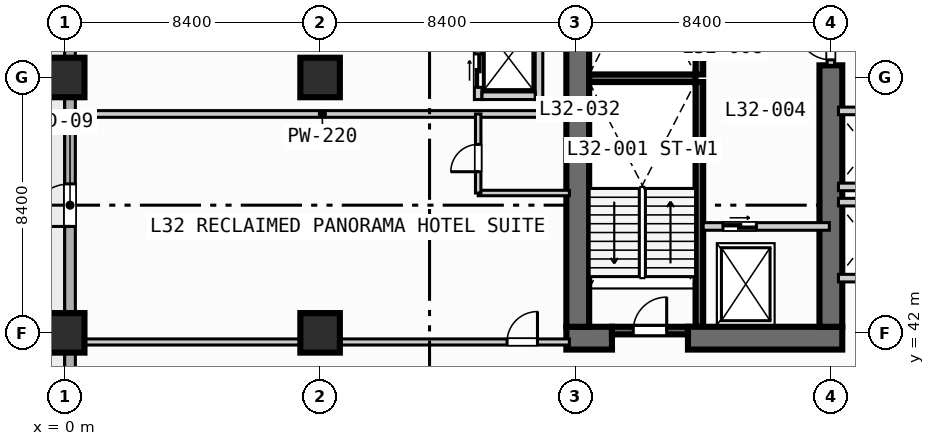
"""IFC4 building model, lengths in metres.
Left out: names, types, materials, properties, quantities, classifications, styles, units other than length and angle.
Written with IfcOpenShell. Run it as: python <this file> out.ifc"""

import sys

from ifc_helpers import new_model, si_unit, direction, frame, frame_2d, origin, origin_2d, place, context, subcontext, project, spatial, rectangle, extrude, element, fill, save


model = new_model("IFC4")
c1 = context("Model", 3, precision=1e-05, world=origin(), true_north=direction((0.0, 1.0)))
c2 = subcontext(c1, "Body", "Model", "MODEL_VIEW")
j1 = project(units=[si_unit("LENGTHUNIT", "METRE"), si_unit("PLANEANGLEUNIT", "RADIAN")], contexts=[c1])
p1 = place(None, origin())
s1 = spatial("IfcSite", under=j1, at=p1, CompositionType="ELEMENT")
p2 = place(p1, origin())
s2 = spatial("IfcBuilding", under=s1, at=p2, CompositionType="ELEMENT")
p3 = place(p2, frame((0.0, 0.0, 134.2)))
s3 = spatial("IfcBuildingStorey", under=s2, at=p3, CompositionType="ELEMENT", Elevation=134.2)
for number, where, z_axis, x_axis in (
    (1, (20.875, 42.2, 0.0), (0.0, 0.0, 1.0), (0.0, 1.0, 0.0)),
    (2, (20.875, 50.5, 0.0), (0.0, 0.0, 1.0), (0.0, 1.0, 0.0)),
):
    element("IfcWall", number, at=place(p3, frame(where, z_axis=z_axis, x_axis=x_axis)), inside=s3, PredefinedType="SOLIDWALL", context=c2, shape_type="SweptSolid", body=[
        extrude(rectangle(XDim=8.05, YDim=0.25, at=frame_2d((4.025, 0.0))), origin(), (0.0, 0.0, 1.0), 3.55),
    ])
p4 = place(p3, frame((17.25, 50.375, 0.0), z_axis=(0.0, 0.0, 1.0), x_axis=(1.0, 0.0, 0.0)))
e3 = element("IfcWall", 3, at=p4, inside=s3, PredefinedType="SOLIDWALL", context=c2, shape_type="SweptSolid", body=[
    extrude(rectangle(XDim=3.5, YDim=0.25, at=frame_2d((1.75, 0.0))), origin(), (0.0, 0.0, 1.0), 3.55),
])
p5 = place(p3, frame((16.5, 41.825, 0.0), z_axis=(0.0, 0.0, 1.0), x_axis=(1.0, 0.0, 0.0)))
e4 = element("IfcWall", 4, at=p5, inside=s3, PredefinedType="SHEAR", context=c2, shape_type="SweptSolid", body=[
    extrude(rectangle(XDim=1.5, YDim=0.75, at=frame_2d((0.75, 0.0))), origin(), (0.0, 0.0, 1.0), 3.55),
])
p6 = place(p3, frame((20.5, 41.825, 0.0), z_axis=(0.0, 0.0, 1.0), x_axis=(1.0, 0.0, 0.0)))
e5 = element("IfcWall", 5, at=p6, inside=s3, PredefinedType="SHEAR", context=c2, shape_type="SweptSolid", body=[
    extrude(rectangle(XDim=5.075, YDim=0.75, at=frame_2d((2.538, 0.0))), origin(), (0.0, 0.0, 1.0), 3.55),
])
p7 = place(p3, frame((16.875, 42.2, 0.0), z_axis=(0.0, 0.0, 1.0), x_axis=(0.0, 1.0, 0.0)))
e6 = element("IfcWall", 6, at=p7, inside=s3, PredefinedType="SHEAR", context=c2, shape_type="SweptSolid", body=[
    extrude(rectangle(XDim=16.35, YDim=0.75, at=frame_2d((8.175, 0.0))), origin(), (0.0, 0.0, 1.0), 3.55),
])
p8 = place(p3, frame((25.2, 42.2, 0.0), z_axis=(0.0, 0.0, 1.0), x_axis=(0.0, 1.0, 0.0)))
e7 = element("IfcWall", 7, at=p8, inside=s3, PredefinedType="SHEAR", context=c2, shape_type="SweptSolid", body=[
    extrude(rectangle(XDim=8.6, YDim=0.75, at=frame_2d((4.3, 0.0))), origin(), (0.0, 0.0, 1.0), 3.55),
])
for number, where, z_axis, x_axis in (
    (8, (0.0, 42.0, 0.0), (0.0, 0.0, 1.0), (1.0, 0.0, 0.0)),
    (9, (0.0, 50.4, 0.0), (0.0, 0.0, 1.0), (1.0, 0.0, 0.0)),
    (10, (8.4, 42.0, 0.0), (0.0, 0.0, 1.0), (1.0, 0.0, 0.0)),
    (11, (8.4, 50.4, 0.0), (0.0, 0.0, 1.0), (1.0, 0.0, 0.0)),
):
    element("IfcColumn", number, at=place(p3, frame(where, z_axis=z_axis, x_axis=x_axis)), inside=s3, PredefinedType="COLUMN", context=c2, shape_type="SweptSolid", body=[
        extrude(rectangle(XDim=1.3, YDim=1.3, at=origin_2d()), origin(), (0.0, 0.0, 1.0), 3.8),
    ])
p9 = place(p3, frame((0.175, 3.175, 0.0), z_axis=(0.0, 0.0, 1.0), x_axis=(0.0, 1.0, 0.0)))
e12 = element("IfcWall", 12, at=p9, inside=s3, PredefinedType="STANDARD", context=c2, shape_type="SweptSolid", body=[
    extrude(rectangle(XDim=86.05, YDim=0.35, at=frame_2d((43.025, 0.0))), origin(), (0.0, 0.0, 1.0), 3.55),
])
p10 = place(p9, frame((42.325, 0.0, 0.0)))
e13 = element("IfcOpeningElement", 13, at=p10, cuts=e12, PredefinedType="OPENING", context=c2, shape_type="SweptSolid", body=[
    extrude(rectangle(XDim=1.4, YDim=2.2, at=frame_2d((0.7, 1.1))), frame((0.0, 0.185, 0.0), z_axis=(0.0, -1.0, 0.0), x_axis=(1.0, 0.0, 0.0)), (0.0, 0.0, 1.0), 0.37),
])
p11 = place(p9, frame((25.125, 0.0, 0.85)))
e14 = element("IfcOpeningElement", 14, at=p11, cuts=e12, PredefinedType="OPENING", context=c2, shape_type="SweptSolid", body=[
    extrude(rectangle(XDim=2.2, YDim=1.8, at=frame_2d((1.1, 0.9))), frame((0.0, 0.185, 0.0), z_axis=(0.0, -1.0, 0.0), x_axis=(1.0, 0.0, 0.0)), (0.0, 0.0, 1.0), 0.37),
])
p12 = place(p9, frame((33.525, 0.0, 0.85)))
e15 = element("IfcOpeningElement", 15, at=p12, cuts=e12, PredefinedType="OPENING", context=c2, shape_type="SweptSolid", body=[
    extrude(rectangle(XDim=2.2, YDim=1.8, at=frame_2d((1.1, 0.9))), frame((0.0, 0.185, 0.0), z_axis=(0.0, -1.0, 0.0), x_axis=(1.0, 0.0, 0.0)), (0.0, 0.0, 1.0), 0.37),
])
p13 = place(p3, frame((18.0, 42.075, 0.0), z_axis=(0.0, 0.0, 1.0), x_axis=(1.0, 0.0, 0.0)))
e16 = element("IfcWall", 16, at=p13, inside=s3, PredefinedType="SOLIDWALL", context=c2, shape_type="SweptSolid", body=[
    extrude(rectangle(XDim=2.5, YDim=0.25, at=frame_2d((1.25, 0.0))), origin(), (0.0, 0.0, 1.0), 3.55),
])
p14 = place(p13, frame((0.7, 0.0, 0.0)))
e17 = element("IfcOpeningElement", 17, at=p14, cuts=e16, PredefinedType="OPENING", context=c2, shape_type="SweptSolid", body=[
    extrude(rectangle(XDim=1.1, YDim=2.15, at=frame_2d((0.55, 1.075))), frame((0.0, 0.135, 0.0), z_axis=(0.0, -1.0, 0.0), x_axis=(1.0, 0.0, 0.0)), (0.0, 0.0, 1.0), 0.27),
])
p15 = place(p3, frame((21.0, 45.5, 0.0), z_axis=(0.0, 0.0, 1.0), x_axis=(1.0, 0.0, 0.0)))
e18 = element("IfcWall", 18, at=p15, inside=s3, PredefinedType="SOLIDWALL", context=c2, shape_type="SweptSolid", body=[
    extrude(rectangle(XDim=4.15, YDim=0.25, at=frame_2d((2.075, 0.0))), origin(), (0.0, 0.0, 1.0), 3.55),
])
p16 = place(p15, frame((0.65, 0.0, 0.0)))
e19 = element("IfcOpeningElement", 19, at=p16, cuts=e18, PredefinedType="OPENING", context=c2, shape_type="SweptSolid", body=[
    extrude(rectangle(XDim=1.1, YDim=2.15, at=frame_2d((0.55, 1.075))), frame((0.0, 0.135, 0.0), z_axis=(0.0, -1.0, 0.0), x_axis=(1.0, 0.0, 0.0)), (0.0, 0.0, 1.0), 0.27),
])
p17 = place(p3, frame((25.2, 50.8, 0.0), z_axis=(0.0, 0.0, 1.0), x_axis=(0.0, 1.0, 0.0)))
e20 = element("IfcWall", 20, at=p17, inside=s3, PredefinedType="SOLIDWALL", context=c2, shape_type="SweptSolid", body=[
    extrude(rectangle(XDim=1.48, YDim=0.25, at=frame_2d((0.74, 0.0))), origin(), (0.0, 0.0, 1.0), 3.55),
])
p18 = place(p17, frame((0.18, 0.0, 0.0)))
e21 = element("IfcOpeningElement", 21, at=p18, cuts=e20, PredefinedType="OPENING", context=c2, shape_type="SweptSolid", body=[
    extrude(rectangle(XDim=1.1, YDim=2.15, at=frame_2d((0.55, 1.075))), frame((0.0, 0.135, 0.0), z_axis=(0.0, -1.0, 0.0), x_axis=(1.0, 0.0, 0.0)), (0.0, 0.0, 1.0), 0.27),
])
p19 = place(p3, frame((13.6, 49.675, 0.0), z_axis=(0.0, 0.0, 1.0), x_axis=(0.0, 1.0, 0.0)))
e22 = element("IfcWall", 22, at=p19, inside=s3, PredefinedType="SOLIDWALL", context=c2, shape_type="SweptSolid", body=[
    extrude(rectangle(XDim=2.75, YDim=0.25, at=frame_2d((1.375, 0.0))), origin(), (0.0, 0.0, 1.0), 3.55),
])
p20 = place(p19, frame((0.4, 0.0, 0.0)))
e23 = element("IfcOpeningElement", 23, at=p20, cuts=e22, PredefinedType="OPENING", context=c2, shape_type="SweptSolid", body=[
    extrude(rectangle(XDim=1.1, YDim=2.15, at=frame_2d((0.55, 1.075))), frame((0.0, 0.135, 0.0), z_axis=(0.0, -1.0, 0.0), x_axis=(1.0, 0.0, 0.0)), (0.0, 0.0, 1.0), 0.27),
])
p21 = place(p3, frame((15.6, 49.675, 0.0), z_axis=(0.0, 0.0, 1.0), x_axis=(0.0, 1.0, 0.0)))
e24 = element("IfcWall", 24, at=p21, inside=s3, PredefinedType="SOLIDWALL", context=c2, shape_type="SweptSolid", body=[
    extrude(rectangle(XDim=2.75, YDim=0.25, at=frame_2d((1.375, 0.0))), origin(), (0.0, 0.0, 1.0), 3.55),
])
p22 = place(p3, frame((13.725, 49.8, 0.0), z_axis=(0.0, 0.0, 1.0), x_axis=(1.0, 0.0, 0.0)))
e25 = element("IfcWall", 25, at=p22, inside=s3, PredefinedType="SOLIDWALL", context=c2, shape_type="SweptSolid", body=[
    extrude(rectangle(XDim=1.75, YDim=0.25, at=frame_2d((0.875, 0.0))), origin(), (0.0, 0.0, 1.0), 3.55),
])
for number, where, z_axis, x_axis in (
    (26, (25.45, 43.8, 0.0), (0.0, 0.0, 1.0), (1.0, 0.0, 0.0)),
    (27, (25.45, 46.3, 0.0), (0.0, 0.0, 1.0), (1.0, 0.0, 0.0)),
    (28, (25.45, 46.8, 0.0), (0.0, 0.0, 1.0), (1.0, 0.0, 0.0)),
    (29, (25.45, 49.3, 0.0), (0.0, 0.0, 1.0), (1.0, 0.0, 0.0)),
):
    element("IfcWall", number, at=place(p3, frame(where, z_axis=z_axis, x_axis=x_axis)), inside=s3, PredefinedType="SOLIDWALL", context=c2, shape_type="SweptSolid", body=[
        extrude(rectangle(XDim=1.825, YDim=0.25, at=frame_2d((0.913, 0.0))), origin(), (0.0, 0.0, 1.0), 3.55),
    ])
p23 = place(p3, frame((0.35, 41.7, 0.0), z_axis=(0.0, 0.0, 1.0), x_axis=(1.0, 0.0, 0.0)))
e30 = element("IfcWall", 30, at=p23, inside=s3, PredefinedType="PARTITIONING", context=c2, shape_type="SweptSolid", body=[
    extrude(rectangle(XDim=16.25, YDim=0.2, at=frame_2d((8.125, 0.0))), origin(), (0.0, 0.0, 1.0), 2.8),
])
p24 = place(p23, frame((14.2, 0.0, 0.0)))
e31 = element("IfcOpeningElement", 31, at=p24, cuts=e30, PredefinedType="OPENING", context=c2, shape_type="SweptSolid", body=[
    extrude(rectangle(XDim=1.0, YDim=2.15, at=frame_2d((0.5, 1.075))), frame((0.0, 0.11, 0.0), z_axis=(0.0, -1.0, 0.0), x_axis=(1.0, 0.0, 0.0)), (0.0, 0.0, 1.0), 0.22),
])
p25 = place(p3, frame((0.35, 49.2, 0.0), z_axis=(0.0, 0.0, 1.0), x_axis=(1.0, 0.0, 0.0)))
e32 = element("IfcWall", 32, at=p25, inside=s3, PredefinedType="PARTITIONING", context=c2, shape_type="SweptSolid", body=[
    extrude(rectangle(XDim=16.25, YDim=0.22, at=frame_2d((8.125, 0.0))), origin(), (0.0, 0.0, 1.0), 3.55),
])
p26 = place(p3, frame((13.6, 46.6, 0.0), z_axis=(0.0, 0.0, 1.0), x_axis=(1.0, 0.0, 0.0)))
e33 = element("IfcWall", 33, at=p26, inside=s3, PredefinedType="PLUMBINGWALL", context=c2, shape_type="SweptSolid", body=[
    extrude(rectangle(XDim=3.0, YDim=0.18, at=frame_2d((1.5, 0.0))), origin(), (0.0, 0.0, 1.0), 3.55),
])
p27 = place(p3, frame((13.6, 46.6, 0.0), z_axis=(0.0, 0.0, 1.0), x_axis=(0.0, 1.0, 0.0)))
e34 = element("IfcWall", 34, at=p27, inside=s3, PredefinedType="PLUMBINGWALL", context=c2, shape_type="SweptSolid", body=[
    extrude(rectangle(XDim=2.6, YDim=0.18, at=frame_2d((1.3, 0.0))), origin(), (0.0, 0.0, 1.0), 3.55),
])
p28 = place(p27, frame((0.7, 0.0, 0.0)))
e35 = element("IfcOpeningElement", 35, at=p28, cuts=e34, PredefinedType="OPENING", context=c2, shape_type="SweptSolid", body=[
    extrude(rectangle(XDim=0.9, YDim=2.1, at=frame_2d((0.45, 1.05))), frame((0.0, 0.1, 0.0), z_axis=(0.0, -1.0, 0.0), x_axis=(1.0, 0.0, 0.0)), (0.0, 0.0, 1.0), 0.2),
])
p29 = place(p10, origin())
e36 = element("IfcDoor", 36, at=p29, inside=s3, OperationType="SINGLE_SWING_LEFT", PredefinedType="DOOR", context=c2, shape_type="SweptSolid", body=[
    extrude(rectangle(XDim=1.4, YDim=2.2, at=frame_2d((0.7, 1.1))), frame((0.0, 0.025, 0.0), z_axis=(0.0, -1.0, 0.0), x_axis=(1.0, 0.0, 0.0)), (0.0, 0.0, 1.0), 0.05),
])
fill(e13, e36)
p30 = place(p14, origin())
e37 = element("IfcDoor", 37, at=p30, inside=s3, OperationType="SINGLE_SWING_RIGHT", PredefinedType="DOOR", context=c2, shape_type="SweptSolid", body=[
    extrude(rectangle(XDim=1.1, YDim=2.15, at=frame_2d((0.55, 1.075))), frame((0.0, 0.025, 0.0), z_axis=(0.0, -1.0, 0.0), x_axis=(1.0, 0.0, 0.0)), (0.0, 0.0, 1.0), 0.05),
])
fill(e17, e37)
p31 = place(p16, origin())
e38 = element("IfcDoor", 38, at=p31, inside=s3, OperationType="SLIDING_TO_LEFT", PredefinedType="DOOR", context=c2, shape_type="SweptSolid", body=[
    extrude(rectangle(XDim=1.1, YDim=2.15, at=frame_2d((0.55, 1.075))), frame((0.0, 0.025, 0.0), z_axis=(0.0, -1.0, 0.0), x_axis=(1.0, 0.0, 0.0)), (0.0, 0.0, 1.0), 0.05),
])
fill(e19, e38)
p32 = place(p18, origin())
e39 = element("IfcDoor", 39, at=p32, inside=s3, OperationType="SINGLE_SWING_RIGHT", PredefinedType="DOOR", context=c2, shape_type="SweptSolid", body=[
    extrude(rectangle(XDim=1.1, YDim=2.15, at=frame_2d((0.55, 1.075))), frame((0.0, 0.025, 0.0), z_axis=(0.0, -1.0, 0.0), x_axis=(1.0, 0.0, 0.0)), (0.0, 0.0, 1.0), 0.05),
])
fill(e21, e39)
p33 = place(p20, origin())
e40 = element("IfcDoor", 40, at=p33, inside=s3, OperationType="SLIDING_TO_LEFT", PredefinedType="DOOR", context=c2, shape_type="SweptSolid", body=[
    extrude(rectangle(XDim=1.1, YDim=2.15, at=frame_2d((0.55, 1.075))), frame((0.0, 0.025, 0.0), z_axis=(0.0, -1.0, 0.0), x_axis=(1.0, 0.0, 0.0)), (0.0, 0.0, 1.0), 0.05),
])
fill(e23, e40)
p34 = place(p24, origin())
e41 = element("IfcDoor", 41, at=p34, inside=s3, OperationType="SINGLE_SWING_RIGHT", PredefinedType="DOOR", context=c2, shape_type="SweptSolid", body=[
    extrude(rectangle(XDim=1.0, YDim=2.15, at=frame_2d((0.5, 1.075))), frame((0.0, 0.025, 0.0), z_axis=(0.0, -1.0, 0.0), x_axis=(1.0, 0.0, 0.0)), (0.0, 0.0, 1.0), 0.05),
])
fill(e31, e41)
p35 = place(p28, origin())
e42 = element("IfcDoor", 42, at=p35, inside=s3, OperationType="SINGLE_SWING_LEFT", PredefinedType="DOOR", context=c2, shape_type="SweptSolid", body=[
    extrude(rectangle(XDim=0.9, YDim=2.1, at=frame_2d((0.45, 1.05))), frame((0.0, 0.025, 0.0), z_axis=(0.0, -1.0, 0.0), x_axis=(1.0, 0.0, 0.0)), (0.0, 0.0, 1.0), 0.05),
])
fill(e35, e42)
save(model, sys.argv[1])
